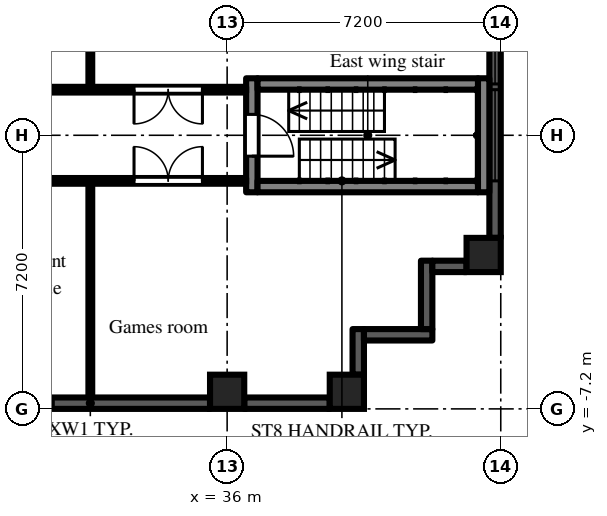
"""IFC4 building model, lengths in metres.
Left out: names, types, materials, properties, quantities, classifications, styles, units other than length and angle.
Written with IfcOpenShell. Run it as: python <this file> out.ifc"""

import sys

from ifc_helpers import new_model, si_unit, direction, frame, frame_2d, origin, origin_2d, place, context, subcontext, project, spatial, rectangle, extrude, element, fill, save


model = new_model("IFC4")
c1 = context("Model", 3, precision=1e-05, world=origin(), true_north=direction((0.0, 1.0)))
c2 = subcontext(c1, "Body", "Model", "MODEL_VIEW")
j1 = project(units=[si_unit("LENGTHUNIT", "METRE"), si_unit("PLANEANGLEUNIT", "RADIAN")], contexts=[c1])
p1 = place(None, origin())
s1 = spatial("IfcSite", under=j1, at=p1, CompositionType="ELEMENT")
p2 = place(p1, origin())
s2 = spatial("IfcBuilding", under=s1, at=p2, CompositionType="ELEMENT")
p3 = place(p2, frame((0.0, 0.0, 69.9)))
s3 = spatial("IfcBuildingStorey", under=s2, at=p3, CompositionType="ELEMENT", Elevation=69.9)
for number, where, z_axis, x_axis in (
    (1, (36.0, -6.75, 0.0), (0.0, 0.0, 1.0), (1.0, 0.0, 0.0)),
    (2, (39.15, -6.75, 0.0), (0.0, 0.0, 1.0), (1.0, 0.0, 0.0)),
    (3, (42.75, -3.15, 0.0), (0.0, 0.0, 1.0), (1.0, 0.0, 0.0)),
):
    element("IfcColumn", number, at=place(p3, frame(where, z_axis=z_axis, x_axis=x_axis)), inside=s3, PredefinedType="COLUMN", context=c2, shape_type="SweptSolid", body=[
        extrude(rectangle(XDim=0.9, YDim=0.9, at=origin_2d()), origin(), (0.0, 0.0, 1.0), 3.0),
    ])
p4 = place(p3, frame((29.25, -7.05, 0.0), z_axis=(0.0, 0.0, 1.0), x_axis=(1.0, 0.0, 0.0)))
e4 = element("IfcWall", 4, at=p4, inside=s3, PredefinedType="SOLIDWALL", context=c2, shape_type="SweptSolid", body=[
    extrude(rectangle(XDim=6.3, YDim=0.3, at=frame_2d((3.15, 0.0))), origin(), (0.0, 0.0, 1.0), 2.1),
])
p5 = place(p4, frame((0.975, 0.0, 0.2)))
e5 = element("IfcOpeningElement", 5, at=p5, cuts=e4, PredefinedType="OPENING", context=c2, shape_type="SweptSolid", body=[
    extrude(rectangle(XDim=1.2, YDim=1.85, at=frame_2d((0.6, 0.925))), frame((0.0, 0.16, 0.0), z_axis=(0.0, -1.0, 0.0), x_axis=(1.0, 0.0, 0.0)), (0.0, 0.0, 1.0), 0.32),
])
p6 = place(p3, frame((36.45, -7.05, 0.0), z_axis=(0.0, 0.0, 1.0), x_axis=(1.0, 0.0, 0.0)))
e6 = element("IfcWall", 6, at=p6, inside=s3, PredefinedType="SOLIDWALL", context=c2, shape_type="SweptSolid", body=[
    extrude(rectangle(XDim=2.25, YDim=0.3, at=frame_2d((1.125, 0.0))), origin(), (0.0, 0.0, 1.0), 2.1),
])
p7 = place(p3, frame((39.45, -6.3, 0.0), z_axis=(0.0, 0.0, 1.0), x_axis=(0.0, 1.0, 0.0)))
e7 = element("IfcWall", 7, at=p7, inside=s3, PredefinedType="SOLIDWALL", context=c2, shape_type="SweptSolid", body=[
    extrude(rectangle(XDim=1.2, YDim=0.3, at=frame_2d((0.6, 0.0))), origin(), (0.0, 0.0, 1.0), 2.575),
])
p8 = place(p3, frame((39.6, -5.25, 0.0), z_axis=(0.0, 0.0, 1.0), x_axis=(1.0, 0.0, 0.0)))
e8 = element("IfcWall", 8, at=p8, inside=s3, PredefinedType="SOLIDWALL", context=c2, shape_type="SweptSolid", body=[
    extrude(rectangle(XDim=1.8, YDim=0.3, at=frame_2d((0.9, 0.0))), origin(), (0.0, 0.0, 1.0), 2.575),
])
p9 = place(p3, frame((41.25, -5.1, 0.0), z_axis=(0.0, 0.0, 1.0), x_axis=(0.0, 1.0, 0.0)))
e9 = element("IfcWall", 9, at=p9, inside=s3, PredefinedType="SOLIDWALL", context=c2, shape_type="SweptSolid", body=[
    extrude(rectangle(XDim=1.8, YDim=0.3, at=frame_2d((0.9, 0.0))), origin(), (0.0, 0.0, 1.0), 2.575),
])
p10 = place(p3, frame((41.4, -3.45, 0.0), z_axis=(0.0, 0.0, 1.0), x_axis=(1.0, 0.0, 0.0)))
e10 = element("IfcWall", 10, at=p10, inside=s3, PredefinedType="SOLIDWALL", context=c2, shape_type="SweptSolid", body=[
    extrude(rectangle(XDim=0.9, YDim=0.3, at=frame_2d((0.45, 0.0))), origin(), (0.0, 0.0, 1.0), 2.575),
])
p11 = place(p3, frame((43.05, -2.7, 0.0), z_axis=(0.0, 0.0, 1.0), x_axis=(0.0, 1.0, 0.0)))
e11 = element("IfcWall", 11, at=p11, inside=s3, PredefinedType="SOLIDWALL", context=c2, shape_type="SweptSolid", body=[
    extrude(rectangle(XDim=5.4, YDim=0.3, at=frame_2d((2.7, 0.0))), origin(), (0.0, 0.0, 1.0), 2.1),
])
p12 = place(p11, frame((1.5, 0.0, 0.2)))
e12 = element("IfcOpeningElement", 12, at=p12, cuts=e11, PredefinedType="OPENING", context=c2, shape_type="SweptSolid", body=[
    extrude(rectangle(XDim=2.4, YDim=1.85, at=frame_2d((1.2, 0.925))), frame((0.0, 0.16, 0.0), z_axis=(0.0, -1.0, 0.0), x_axis=(1.0, 0.0, 0.0)), (0.0, 0.0, 1.0), 0.32),
])
p13 = place(p11, frame((4.05, 0.0, 0.2)))
e13 = element("IfcOpeningElement", 13, at=p13, cuts=e11, PredefinedType="OPENING", context=c2, shape_type="SweptSolid", body=[
    extrude(rectangle(XDim=1.2, YDim=1.85, at=frame_2d((0.6, 0.925))), frame((0.0, 0.16, 0.0), z_axis=(0.0, -1.0, 0.0), x_axis=(1.0, 0.0, 0.0)), (0.0, 0.0, 1.0), 0.32),
])
p14 = place(p3, frame((36.65, -1.5, 0.0), z_axis=(0.0, 0.0, 1.0), x_axis=(0.0, 1.0, 0.0)))
e14 = element("IfcWall", 14, at=p14, inside=s3, PredefinedType="SHEAR", context=c2, shape_type="SweptSolid", body=[
    extrude(rectangle(XDim=3.0, YDim=0.3, at=frame_2d((1.5, 0.0))), origin(), (0.0, 0.0, 1.0), 2.575),
])
p15 = place(p14, frame((0.95, 0.0, 0.0)))
e15 = element("IfcOpeningElement", 15, at=p15, cuts=e14, PredefinedType="OPENING", context=c2, shape_type="SweptSolid", body=[
    extrude(rectangle(XDim=1.1, YDim=2.1, at=frame_2d((0.55, 1.05))), frame((0.0, 0.16, 0.0), z_axis=(0.0, -1.0, 0.0), x_axis=(1.0, 0.0, 0.0)), (0.0, 0.0, 1.0), 0.32),
])
p16 = place(p3, frame((42.75, -1.5, 0.0), z_axis=(0.0, 0.0, 1.0), x_axis=(0.0, 1.0, 0.0)))
e16 = element("IfcWall", 16, at=p16, inside=s3, PredefinedType="SHEAR", context=c2, shape_type="SweptSolid", body=[
    extrude(rectangle(XDim=3.0, YDim=0.3, at=frame_2d((1.5, 0.0))), origin(), (0.0, 0.0, 1.0), 2.575),
])
for number, where, z_axis, x_axis in (
    (17, (36.8, -1.35, 0.0), (0.0, 0.0, 1.0), (1.0, 0.0, 0.0)),
    (18, (36.8, 1.35, 0.0), (0.0, 0.0, 1.0), (1.0, 0.0, 0.0)),
):
    element("IfcWall", number, at=place(p3, frame(where, z_axis=z_axis, x_axis=x_axis)), inside=s3, PredefinedType="SHEAR", context=c2, shape_type="SweptSolid", body=[
        extrude(rectangle(XDim=5.8, YDim=0.3, at=frame_2d((2.9, 0.0))), origin(), (0.0, 0.0, 1.0), 2.575),
    ])
p17 = place(p3, frame((21.6, -1.2, 0.0), z_axis=(0.0, 0.0, 1.0), x_axis=(1.0, 0.0, 0.0)))
e19 = element("IfcWall", 19, at=p17, inside=s3, PredefinedType="PARTITIONING", context=c2, shape_type="SweptSolid", body=[
    extrude(rectangle(XDim=14.9, YDim=0.15, at=frame_2d((7.45, 0.0))), origin(), (0.0, 0.0, 1.0), 2.575),
])
p18 = place(p17, frame((0.2, 0.0, 0.0)))
e20 = element("IfcOpeningElement", 20, at=p18, cuts=e19, PredefinedType="OPENING", context=c2, shape_type="SweptSolid", body=[
    extrude(rectangle(XDim=1.0, YDim=2.1, at=frame_2d((0.5, 1.05))), frame((0.0, 0.085, 0.0), z_axis=(0.0, -1.0, 0.0), x_axis=(1.0, 0.0, 0.0)), (0.0, 0.0, 1.0), 0.17),
])
p19 = place(p17, frame((5.71, 0.0, 0.0)))
e21 = element("IfcOpeningElement", 21, at=p19, cuts=e19, PredefinedType="OPENING", context=c2, shape_type="SweptSolid", body=[
    extrude(rectangle(XDim=1.0, YDim=2.1, at=frame_2d((0.5, 1.05))), frame((0.0, 0.085, 0.0), z_axis=(0.0, -1.0, 0.0), x_axis=(1.0, 0.0, 0.0)), (0.0, 0.0, 1.0), 0.17),
])
p20 = place(p17, frame((11.95, 0.0, 0.0)))
e22 = element("IfcOpeningElement", 22, at=p20, cuts=e19, PredefinedType="OPENING", context=c2, shape_type="SweptSolid", body=[
    extrude(rectangle(XDim=1.8, YDim=2.1, at=frame_2d((0.9, 1.05))), frame((0.0, 0.085, 0.0), z_axis=(0.0, -1.0, 0.0), x_axis=(1.0, 0.0, 0.0)), (0.0, 0.0, 1.0), 0.17),
])
p21 = place(p3, frame((21.6, 1.2, 0.0), z_axis=(0.0, 0.0, 1.0), x_axis=(1.0, 0.0, 0.0)))
e23 = element("IfcWall", 23, at=p21, inside=s3, PredefinedType="PARTITIONING", context=c2, shape_type="SweptSolid", body=[
    extrude(rectangle(XDim=14.9, YDim=0.15, at=frame_2d((7.45, 0.0))), origin(), (0.0, 0.0, 1.0), 2.575),
])
p22 = place(p21, frame((1.35, 0.0, 0.0)))
e24 = element("IfcOpeningElement", 24, at=p22, cuts=e23, PredefinedType="OPENING", context=c2, shape_type="SweptSolid", body=[
    extrude(rectangle(XDim=0.9, YDim=2.1, at=frame_2d((0.45, 1.05))), frame((0.0, 0.085, 0.0), z_axis=(0.0, -1.0, 0.0), x_axis=(1.0, 0.0, 0.0)), (0.0, 0.0, 1.0), 0.17),
])
p23 = place(p21, frame((6.3, 0.0, 0.0)))
e25 = element("IfcOpeningElement", 25, at=p23, cuts=e23, PredefinedType="OPENING", context=c2, shape_type="SweptSolid", body=[
    extrude(rectangle(XDim=1.8, YDim=2.1, at=frame_2d((0.9, 1.05))), frame((0.0, 0.085, 0.0), z_axis=(0.0, -1.0, 0.0), x_axis=(1.0, 0.0, 0.0)), (0.0, 0.0, 1.0), 0.17),
])
p24 = place(p21, frame((11.95, 0.0, 0.0)))
e26 = element("IfcOpeningElement", 26, at=p24, cuts=e23, PredefinedType="OPENING", context=c2, shape_type="SweptSolid", body=[
    extrude(rectangle(XDim=1.8, YDim=2.1, at=frame_2d((0.9, 1.05))), frame((0.0, 0.085, 0.0), z_axis=(0.0, -1.0, 0.0), x_axis=(1.0, 0.0, 0.0)), (0.0, 0.0, 1.0), 0.17),
])
for number, where, z_axis, x_axis in (
    (27, (32.4, -6.9, 0.0), (0.0, 0.0, 1.0), (0.0, 1.0, 0.0)),
    (28, (32.4, 1.275, 0.0), (0.0, 0.0, 1.0), (0.0, 1.0, 0.0)),
):
    element("IfcWall", number, at=place(p3, frame(where, z_axis=z_axis, x_axis=x_axis)), inside=s3, PredefinedType="PARTITIONING", context=c2, shape_type="SweptSolid", body=[
        extrude(rectangle(XDim=5.625, YDim=0.1, at=frame_2d((2.812, 0.0))), origin(), (0.0, 0.0, 1.0), 2.575),
    ])
p25 = place(p5, origin())
e29 = element("IfcWindow", 29, at=p25, inside=s3, PartitioningType="SINGLE_PANEL", PredefinedType="WINDOW", context=c2, shape_type="SweptSolid", body=[
    extrude(rectangle(XDim=1.2, YDim=1.85, at=frame_2d((0.6, 0.925))), frame((0.0, 0.03, 0.0), z_axis=(0.0, -1.0, 0.0), x_axis=(1.0, 0.0, 0.0)), (0.0, 0.0, 1.0), 0.06),
])
fill(e5, e29)
p26 = place(p12, origin())
e30 = element("IfcWindow", 30, at=p26, inside=s3, PartitioningType="SINGLE_PANEL", PredefinedType="WINDOW", context=c2, shape_type="SweptSolid", body=[
    extrude(rectangle(XDim=2.4, YDim=1.85, at=frame_2d((1.2, 0.925))), frame((0.0, 0.03, 0.0), z_axis=(0.0, -1.0, 0.0), x_axis=(1.0, 0.0, 0.0)), (0.0, 0.0, 1.0), 0.06),
])
fill(e12, e30)
p27 = place(p13, origin())
e31 = element("IfcWindow", 31, at=p27, inside=s3, PartitioningType="SINGLE_PANEL", PredefinedType="WINDOW", context=c2, shape_type="SweptSolid", body=[
    extrude(rectangle(XDim=1.2, YDim=1.85, at=frame_2d((0.6, 0.925))), frame((0.0, 0.03, 0.0), z_axis=(0.0, -1.0, 0.0), x_axis=(1.0, 0.0, 0.0)), (0.0, 0.0, 1.0), 0.06),
])
fill(e13, e31)
p28 = place(p15, frame((1.1, 0.0, 0.0), z_axis=(0.0, 0.0, 1.0), x_axis=(-1.0, 0.0, 0.0)))
e32 = element("IfcDoor", 32, at=p28, inside=s3, OperationType="SINGLE_SWING_RIGHT", PredefinedType="DOOR", context=c2, shape_type="SweptSolid", body=[
    extrude(rectangle(XDim=1.1, YDim=2.1, at=frame_2d((0.55, 1.05))), frame((0.0, 0.025, 0.0), z_axis=(0.0, -1.0, 0.0), x_axis=(1.0, 0.0, 0.0)), (0.0, 0.0, 1.0), 0.05),
])
fill(e15, e32)
p29 = place(p24, frame((1.8, 0.0, 0.0), z_axis=(0.0, 0.0, 1.0), x_axis=(-1.0, 0.0, 0.0)))
e33 = element("IfcDoor", 33, at=p29, inside=s3, OperationType="DOUBLE_DOOR_DOUBLE_SWING", PredefinedType="DOOR", context=c2, shape_type="SweptSolid", body=[
    extrude(rectangle(XDim=1.8, YDim=2.1, at=frame_2d((0.9, 1.05))), frame((0.0, 0.025, 0.0), z_axis=(0.0, -1.0, 0.0), x_axis=(1.0, 0.0, 0.0)), (0.0, 0.0, 1.0), 0.05),
])
fill(e26, e33)
p30 = place(p20, origin())
e34 = element("IfcDoor", 34, at=p30, inside=s3, OperationType="DOUBLE_DOOR_DOUBLE_SWING", PredefinedType="DOOR", context=c2, shape_type="SweptSolid", body=[
    extrude(rectangle(XDim=1.8, YDim=2.1, at=frame_2d((0.9, 1.05))), frame((0.0, 0.025, 0.0), z_axis=(0.0, -1.0, 0.0), x_axis=(1.0, 0.0, 0.0)), (0.0, 0.0, 1.0), 0.05),
])
fill(e22, e34)
save(model, sys.argv[1])
